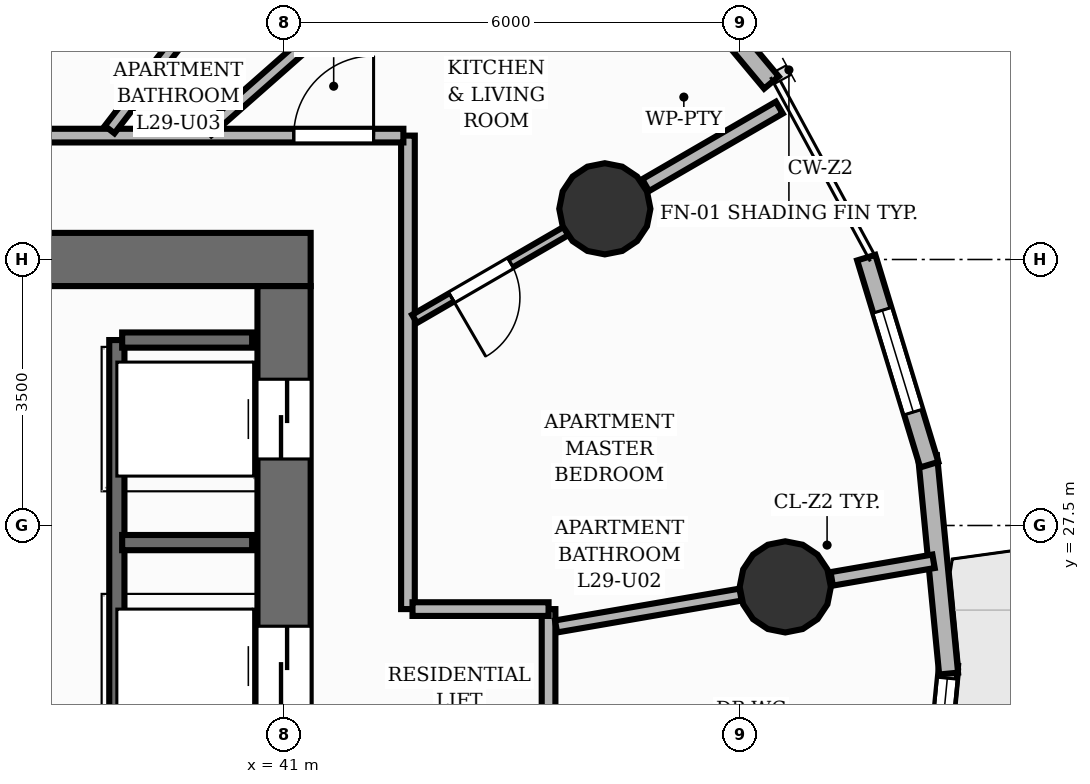
"""IFC4 building model, lengths in metres.
Left out: names, types, materials, properties, quantities, classifications, styles, units other than length and angle.
Written with IfcOpenShell. Run it as: python <this file> out.ifc"""

import sys

from ifc_helpers import new_model, si_unit, direction, frame, frame_2d, origin, origin_2d, place, context, subcontext, project, spatial, rectangle, circle, extrude, element, fill, save


model = new_model("IFC4")
c1 = context("Model", 3, precision=1e-05, world=origin(), true_north=direction((0.0, 1.0)))
c2 = subcontext(c1, "Body", "Model", "MODEL_VIEW")
j1 = project(units=[si_unit("LENGTHUNIT", "METRE"), si_unit("PLANEANGLEUNIT", "RADIAN")], contexts=[c1])
p1 = place(None, origin())
s1 = spatial("IfcSite", under=j1, at=p1, CompositionType="ELEMENT")
p2 = place(p1, origin())
s2 = spatial("IfcBuilding", under=s1, at=p2, CompositionType="ELEMENT")
p3 = place(p2, frame((0.0, 0.0, 99.68)))
s3 = spatial("IfcBuildingStorey", under=s2, at=p3, CompositionType="ELEMENT", Elevation=99.68)
p4 = place(p3, frame((22.65, 31.0, 0.0), z_axis=(0.0, 0.0, 1.0), x_axis=(1.0, 0.0, 0.0)))
e1 = element("IfcWall", 1, at=p4, inside=s3, PredefinedType="SHEAR", context=c2, shape_type="SweptSolid", body=[
    extrude(rectangle(XDim=18.7, YDim=0.7, at=frame_2d((9.35, 0.0))), origin(), (0.0, 0.0, 1.0), 3.2),
])
p5 = place(p4, frame((11.75, 0.0, 0.0)))
e2 = element("IfcOpeningElement", 2, at=p5, cuts=e1, PredefinedType="OPENING", context=c2, shape_type="SweptSolid", body=[
    extrude(rectangle(XDim=1.1, YDim=2.15, at=frame_2d((0.55, 1.075))), frame((0.0, 0.36, 0.0), z_axis=(0.0, -1.0, 0.0), x_axis=(1.0, 0.0, 0.0)), (0.0, 0.0, 1.0), 0.72),
])
p6 = place(p3, frame((41.0, 17.35, 0.0), z_axis=(0.0, 0.0, 1.0), x_axis=(0.0, 1.0, 0.0)))
e3 = element("IfcWall", 3, at=p6, inside=s3, PredefinedType="SHEAR", context=c2, shape_type="SweptSolid", body=[
    extrude(rectangle(XDim=13.3, YDim=0.7, at=frame_2d((6.65, 0.0))), origin(), (0.0, 0.0, 1.0), 3.2),
])
p7 = place(p6, frame((1.225, 0.0, 0.0)))
e4 = element("IfcOpeningElement", 4, at=p7, cuts=e3, PredefinedType="OPENING", context=c2, shape_type="SweptSolid", body=[
    extrude(rectangle(XDim=1.05, YDim=2.15, at=frame_2d((0.525, 1.075))), frame((0.0, 0.36, 0.0), z_axis=(0.0, -1.0, 0.0), x_axis=(1.0, 0.0, 0.0)), (0.0, 0.0, 1.0), 0.72),
])
p8 = place(p6, frame((4.475, 0.0, 0.0)))
e5 = element("IfcOpeningElement", 5, at=p8, cuts=e3, PredefinedType="OPENING", context=c2, shape_type="SweptSolid", body=[
    extrude(rectangle(XDim=1.05, YDim=2.15, at=frame_2d((0.525, 1.075))), frame((0.0, 0.36, 0.0), z_axis=(0.0, -1.0, 0.0), x_axis=(1.0, 0.0, 0.0)), (0.0, 0.0, 1.0), 0.72),
])
p9 = place(p6, frame((7.775, 0.0, 0.0)))
e6 = element("IfcOpeningElement", 6, at=p9, cuts=e3, PredefinedType="OPENING", context=c2, shape_type="SweptSolid", body=[
    extrude(rectangle(XDim=1.05, YDim=2.15, at=frame_2d((0.525, 1.075))), frame((0.0, 0.36, 0.0), z_axis=(0.0, -1.0, 0.0), x_axis=(1.0, 0.0, 0.0)), (0.0, 0.0, 1.0), 0.72),
])
p10 = place(p6, frame((11.025, 0.0, 0.0)))
e7 = element("IfcOpeningElement", 7, at=p10, cuts=e3, PredefinedType="OPENING", context=c2, shape_type="SweptSolid", body=[
    extrude(rectangle(XDim=1.05, YDim=2.15, at=frame_2d((0.525, 1.075))), frame((0.0, 0.36, 0.0), z_axis=(0.0, -1.0, 0.0), x_axis=(1.0, 0.0, 0.0)), (0.0, 0.0, 1.0), 0.72),
])
for number, where, z_axis, x_axis in (
    (8, (47.594, 26.692, 0.0), (0.0, 0.0, 1.0), (1.0, 0.0, 0.0)),
    (9, (45.22, 31.667, 0.0), (0.0, 0.0, 1.0), (1.0, 0.0, 0.0)),
):
    element("IfcColumn", number, at=place(p3, frame(where, z_axis=z_axis, x_axis=x_axis)), inside=s3, PredefinedType="COLUMN", context=c2, shape_type="SweptSolid", body=[
        extrude(circle(Radius=0.6, at=origin_2d()), origin(), (0.0, 0.0, 1.0), 3.2),
    ])
p11 = place(p3, frame((45.572, 35.535, 0.0), z_axis=(0.0, 0.0, 1.0), x_axis=(0.640518566271, -0.76794268423, 0.0)))
e10 = element("IfcWall", 10, at=p11, inside=s3, PredefinedType="SOLIDWALL", context=c2, shape_type="SweptSolid", body=[
    extrude(rectangle(XDim=2.874, YDim=0.25, at=frame_2d((1.437, 0.0))), origin(), (0.0, 0.0, 1.0), 2.96),
])
p12 = place(p11, frame((0.612, 0.0, 0.85)))
e11 = element("IfcOpeningElement", 11, at=p12, cuts=e10, PredefinedType="OPENING", context=c2, shape_type="SweptSolid", body=[
    extrude(rectangle(XDim=1.65, YDim=1.55, at=frame_2d((0.825, 0.775))), frame((0.0, 0.135, 0.0), z_axis=(0.0, -1.0, 0.0), x_axis=(1.0, 0.0, 0.0)), (0.0, 0.0, 1.0), 0.27),
])
p13 = place(p3, frame((49.743, 25.665, 0.0), z_axis=(0.0, 0.0, 1.0), x_axis=(-0.096873982201, -0.995296655059, 0.0)))
e12 = element("IfcWall", 12, at=p13, inside=s3, PredefinedType="SOLIDWALL", context=c2, shape_type="SweptSolid", body=[
    extrude(rectangle(XDim=2.923, YDim=0.25, at=frame_2d((1.462, 0.0))), origin(), (0.0, 0.0, 1.0), 2.96),
])
p14 = place(p13, frame((0.175, 0.0, 0.85)))
e13 = element("IfcOpeningElement", 13, at=p14, cuts=e12, PredefinedType="OPENING", context=c2, shape_type="SweptSolid", body=[
    extrude(rectangle(XDim=1.4, YDim=1.55, at=frame_2d((0.7, 0.775))), frame((0.0, 0.135, 0.0), z_axis=(0.0, -1.0, 0.0), x_axis=(1.0, 0.0, 0.0)), (0.0, 0.0, 1.0), 0.27),
])
p15 = place(p3, frame((49.467, 28.412, 0.0), z_axis=(0.0, 0.0, 1.0), x_axis=(0.096332339466, -0.995349225334, 0.0)))
e14 = element("IfcWall", 14, at=p15, inside=s3, PredefinedType="SOLIDWALL", context=c2, shape_type="SweptSolid", body=[
    extrude(rectangle(XDim=2.874, YDim=0.25, at=frame_2d((1.437, 0.0))), origin(), (0.0, 0.0, 1.0), 2.96),
])
p16 = place(p3, frame((48.66, 31.024, 0.0), z_axis=(0.0, 0.0, 1.0), x_axis=(0.291144558409, -0.956679071637, 0.0)))
e15 = element("IfcWall", 15, at=p16, inside=s3, PredefinedType="SOLIDWALL", context=c2, shape_type="SweptSolid", body=[
    extrude(rectangle(XDim=2.848, YDim=0.25, at=frame_2d((1.424, 0.0))), origin(), (0.0, 0.0, 1.0), 2.96),
])
p17 = place(p16, frame((0.724, 0.0, 0.85)))
e16 = element("IfcOpeningElement", 16, at=p17, cuts=e15, PredefinedType="OPENING", context=c2, shape_type="SweptSolid", body=[
    extrude(rectangle(XDim=1.4, YDim=1.55, at=frame_2d((0.7, 0.775))), frame((0.0, 0.135, 0.0), z_axis=(0.0, -1.0, 0.0), x_axis=(1.0, 0.0, 0.0)), (0.0, 0.0, 1.0), 0.27),
])
p18 = place(p3, frame((38.8, 18.06, 0.0), z_axis=(0.0, 0.0, 1.0), x_axis=(0.0, 1.0, 0.0)))
e17 = element("IfcWall", 17, at=p18, inside=s3, PredefinedType="SHEAR", context=c2, shape_type="SweptSolid", body=[
    extrude(rectangle(XDim=11.88, YDim=0.2, at=frame_2d((5.94, 0.0))), origin(), (0.0, 0.0, 1.0), 3.2),
])
for number, where, z_axis, x_axis in (
    (18, (38.87, 29.94, 0.0), (0.0, 0.0, 1.0), (1.0, 0.0, 0.0)),
    (19, (38.87, 27.275, 0.0), (0.0, 0.0, 1.0), (1.0, 0.0, 0.0)),
):
    element("IfcWall", number, at=place(p3, frame(where, z_axis=z_axis, x_axis=x_axis)), inside=s3, PredefinedType="SHEAR", context=c2, shape_type="SweptSolid", body=[
        extrude(rectangle(XDim=1.71, YDim=0.2, at=frame_2d((0.855, 0.0))), origin(), (0.0, 0.0, 1.0), 3.2),
    ])
p19 = place(p3, frame((48.206, 26.798, 0.0), z_axis=(0.0, 0.0, 1.0), x_axis=(0.98540615772, 0.170219576807, 0.0)))
e20 = element("IfcWall", 20, at=p19, inside=s3, PredefinedType="PARTITIONING", context=c2, shape_type="SweptSolid", body=[
    extrude(rectangle(XDim=1.36, YDim=0.18, at=frame_2d((0.68, 0.0))), origin(), (0.0, 0.0, 1.0), 2.261),
])
p20 = place(p3, frame((45.757, 31.978, 0.0), z_axis=(0.0, 0.0, 1.0), x_axis=(0.865025978628, 0.501727073516, 0.0)))
e21 = element("IfcWall", 21, at=p20, inside=s3, PredefinedType="PARTITIONING", context=c2, shape_type="SweptSolid", body=[
    extrude(rectangle(XDim=2.033, YDim=0.18, at=frame_2d((1.017, 0.0))), origin(), (0.0, 0.0, 1.0), 2.261),
])
p21 = place(p3, frame((44.48, 26.4, 0.0), z_axis=(0.0, 0.0, 1.0), x_axis=(0.0, -1.0, 0.0)))
e22 = element("IfcWall", 22, at=p21, inside=s3, PredefinedType="PARTITIONING", context=c2, shape_type="SweptSolid", body=[
    extrude(rectangle(XDim=4.8, YDim=0.18, at=frame_2d((2.4, 0.0))), origin(), (0.0, 0.0, 1.0), 2.955),
])
p22 = place(p21, frame((2.84, 0.0, 0.0)))
e23 = element("IfcOpeningElement", 23, at=p22, cuts=e22, PredefinedType="OPENING", context=c2, shape_type="SweptSolid", body=[
    extrude(rectangle(XDim=1.05, YDim=2.15, at=frame_2d((0.525, 1.075))), frame((0.0, 0.1, 0.0), z_axis=(0.0, -1.0, 0.0), x_axis=(1.0, 0.0, 0.0)), (0.0, 0.0, 1.0), 0.2),
])
p23 = place(p3, frame((42.63, 32.63, 0.0), z_axis=(0.0, 0.0, 1.0), x_axis=(0.0, -1.0, 0.0)))
e24 = element("IfcWall", 24, at=p23, inside=s3, PredefinedType="PARTITIONING", context=c2, shape_type="SweptSolid", body=[
    extrude(rectangle(XDim=6.23, YDim=0.18, at=frame_2d((3.115, 0.0))), origin(), (0.0, 0.0, 1.0), 2.955),
])
p24 = place(p3, frame((34.015, 32.63, 0.0), z_axis=(0.0, 0.0, 1.0), x_axis=(1.0, 0.0, 0.0)))
e25 = element("IfcWall", 25, at=p24, inside=s3, PredefinedType="PARTITIONING", context=c2, shape_type="SweptSolid", body=[
    extrude(rectangle(XDim=8.555, YDim=0.18, at=frame_2d((4.277, 0.0))), origin(), (0.0, 0.0, 1.0), 2.955),
])
p25 = place(p24, frame((7.112, 0.0, 0.0)))
e26 = element("IfcOpeningElement", 26, at=p25, cuts=e25, PredefinedType="OPENING", context=c2, shape_type="SweptSolid", body=[
    extrude(rectangle(XDim=1.05, YDim=2.15, at=frame_2d((0.525, 1.075))), frame((0.0, 0.1, 0.0), z_axis=(0.0, -1.0, 0.0), x_axis=(1.0, 0.0, 0.0)), (0.0, 0.0, 1.0), 0.2),
])
p26 = place(p3, frame((42.69, 26.4, 0.0), z_axis=(0.0, 0.0, 1.0), x_axis=(1.0, 0.0, 0.0)))
e27 = element("IfcWall", 27, at=p26, inside=s3, PredefinedType="PARTITIONING", context=c2, shape_type="SweptSolid", body=[
    extrude(rectangle(XDim=1.79, YDim=0.18, at=frame_2d((0.895, 0.0))), origin(), (0.0, 0.0, 1.0), 2.261),
])
p27 = place(p3, frame((44.579, 26.171, 0.0), z_axis=(0.0, 0.0, 1.0), x_axis=(0.985404570769, 0.170228763457, 0.0)))
e28 = element("IfcWall", 28, at=p27, inside=s3, PredefinedType="PLUMBINGWALL", context=c2, shape_type="SweptSolid", body=[
    extrude(rectangle(XDim=2.464, YDim=0.16, at=frame_2d((1.232, 0.0))), origin(), (0.0, 0.0, 1.0), 2.261),
])
p28 = place(p3, frame((39.991, 32.696, 0.0), z_axis=(0.0, 0.0, 1.0), x_axis=(0.750059872717, 0.661369932292, 0.0)))
e29 = element("IfcWall", 29, at=p28, inside=s3, PredefinedType="PLUMBINGWALL", context=c2, shape_type="SweptSolid", body=[
    extrude(rectangle(XDim=5.775, YDim=0.16, at=frame_2d((2.888, 0.0))), origin(), (0.0, 0.0, 1.0), 2.955),
])
p29 = place(p28, frame((3.278, 0.0, 0.0)))
e30 = element("IfcOpeningElement", 30, at=p29, cuts=e29, PredefinedType="OPENING", context=c2, shape_type="SweptSolid", body=[
    extrude(rectangle(XDim=0.9, YDim=2.1, at=frame_2d((0.45, 1.05))), frame((0.0, 0.09, 0.0), z_axis=(0.0, -1.0, 0.0), x_axis=(1.0, 0.0, 0.0)), (0.0, 0.0, 1.0), 0.18),
])
p30 = place(p3, frame((44.711, 31.375, 0.0), z_axis=(0.0, 0.0, 1.0), x_axis=(-0.864966854608, -0.501828995207, 0.0)))
e31 = element("IfcWall", 31, at=p30, inside=s3, PredefinedType="PARTITIONING", context=c2, shape_type="SweptSolid", body=[
    extrude(rectangle(XDim=2.306, YDim=0.125, at=frame_2d((1.153, 0.0))), origin(), (0.0, 0.0, 1.0), 2.261),
])
p31 = place(p30, frame((0.843, 0.0, 0.0)))
e32 = element("IfcOpeningElement", 32, at=p31, cuts=e31, PredefinedType="OPENING", context=c2, shape_type="SweptSolid", body=[
    extrude(rectangle(XDim=0.9, YDim=2.1, at=frame_2d((0.45, 1.05))), frame((0.0, 0.073, 0.0), z_axis=(0.0, -1.0, 0.0), x_axis=(1.0, 0.0, 0.0)), (0.0, 0.0, 1.0), 0.145),
])
p32 = place(p3, frame((38.705, 32.709, 0.0), z_axis=(0.0, 0.0, 1.0), x_axis=(0.610033601295, 0.792375545617, 0.0)))
e33 = element("IfcWall", 33, at=p32, inside=s3, PredefinedType="PLUMBINGWALL", context=c2, shape_type="SweptSolid", body=[
    extrude(rectangle(XDim=2.887, YDim=0.16, at=frame_2d((1.443, 0.0))), origin(), (0.0, 0.0, 1.0), 2.261),
])
p33 = place(p14, origin())
e34 = element("IfcWindow", 34, at=p33, inside=s3, PartitioningType="SINGLE_PANEL", PredefinedType="WINDOW", context=c2, shape_type="SweptSolid", body=[
    extrude(rectangle(XDim=1.4, YDim=1.55, at=frame_2d((0.7, 0.775))), frame((0.0, 0.03, 0.0), z_axis=(0.0, -1.0, 0.0), x_axis=(1.0, 0.0, 0.0)), (0.0, 0.0, 1.0), 0.06),
])
fill(e13, e34)
p34 = place(p17, origin())
e35 = element("IfcWindow", 35, at=p34, inside=s3, PartitioningType="SINGLE_PANEL", PredefinedType="WINDOW", context=c2, shape_type="SweptSolid", body=[
    extrude(rectangle(XDim=1.4, YDim=1.55, at=frame_2d((0.7, 0.775))), frame((0.0, 0.03, 0.0), z_axis=(0.0, -1.0, 0.0), x_axis=(1.0, 0.0, 0.0)), (0.0, 0.0, 1.0), 0.06),
])
fill(e16, e35)
p35 = place(p9, origin())
e36 = element("IfcDoor", 36, at=p35, inside=s3, OperationType="DOUBLE_DOOR_SLIDING", PredefinedType="DOOR", context=c2, shape_type="SweptSolid", body=[
    extrude(rectangle(XDim=1.05, YDim=2.15, at=frame_2d((0.525, 1.075))), frame((0.0, 0.025, 0.0), z_axis=(0.0, -1.0, 0.0), x_axis=(1.0, 0.0, 0.0)), (0.0, 0.0, 1.0), 0.05),
])
fill(e6, e36)
p36 = place(p10, origin())
e37 = element("IfcDoor", 37, at=p36, inside=s3, OperationType="DOUBLE_DOOR_SLIDING", PredefinedType="DOOR", context=c2, shape_type="SweptSolid", body=[
    extrude(rectangle(XDim=1.05, YDim=2.15, at=frame_2d((0.525, 1.075))), frame((0.0, 0.025, 0.0), z_axis=(0.0, -1.0, 0.0), x_axis=(1.0, 0.0, 0.0)), (0.0, 0.0, 1.0), 0.05),
])
fill(e7, e37)
p37 = place(p25, origin())
e38 = element("IfcDoor", 38, at=p37, inside=s3, OperationType="SINGLE_SWING_RIGHT", PredefinedType="DOOR", context=c2, shape_type="SweptSolid", body=[
    extrude(rectangle(XDim=1.05, YDim=2.15, at=frame_2d((0.525, 1.075))), frame((0.0, 0.025, 0.0), z_axis=(0.0, -1.0, 0.0), x_axis=(1.0, 0.0, 0.0)), (0.0, 0.0, 1.0), 0.05),
])
fill(e26, e38)
p38 = place(p31, origin())
e39 = element("IfcDoor", 39, at=p38, inside=s3, OperationType="SINGLE_SWING_RIGHT", PredefinedType="DOOR", context=c2, shape_type="SweptSolid", body=[
    extrude(rectangle(XDim=0.9, YDim=2.1, at=frame_2d((0.45, 1.05))), frame((0.0, 0.025, 0.0), z_axis=(0.0, -1.0, 0.0), x_axis=(1.0, 0.0, 0.0)), (0.0, 0.0, 1.0), 0.05),
])
fill(e32, e39)
save(model, sys.argv[1])
